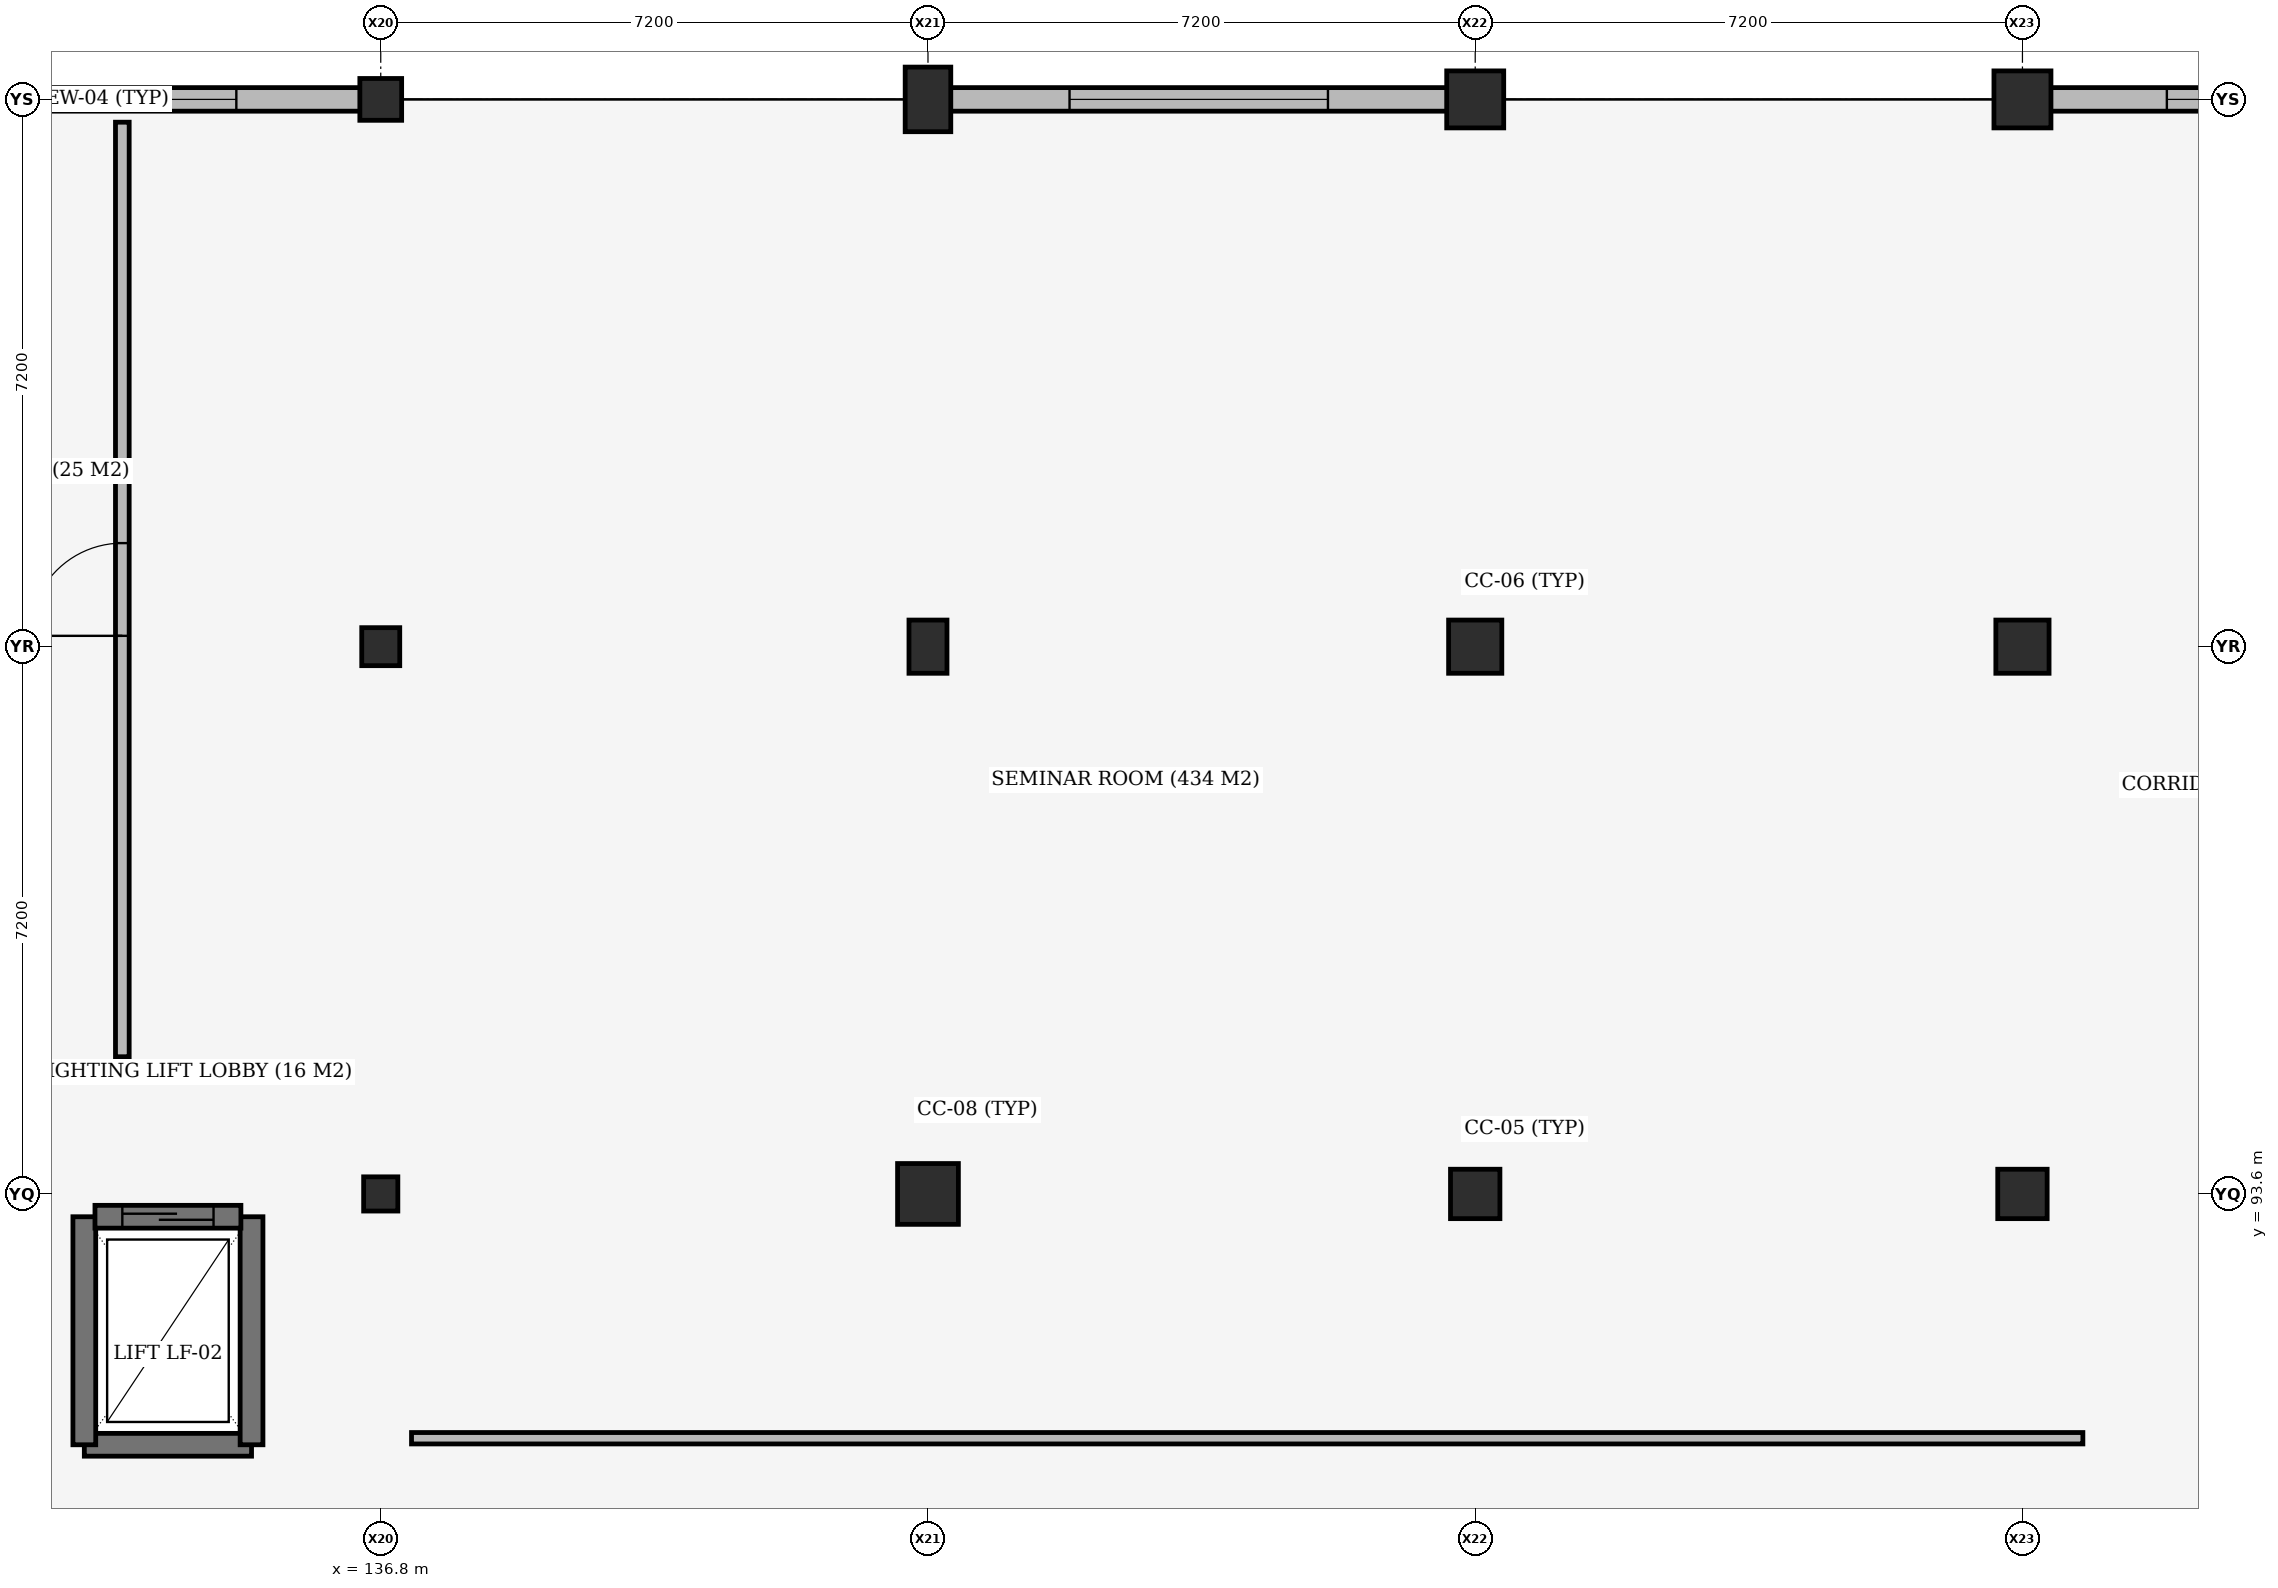
"""IFC4 building model, lengths in metres.
Left out: names, types, materials, properties, quantities, classifications, styles, units other than length and angle.
Written with IfcOpenShell. Run it as: python <this file> out.ifc"""

import sys

from ifc_helpers import new_model, si_unit, direction, frame, frame_2d, origin, origin_2d, place, context, subcontext, project, spatial, rectangle, extrude, element, fill, save


model = new_model("IFC4")
c1 = context("Model", 3, precision=1e-05, world=origin(), true_north=direction((0.0, 1.0)))
c2 = subcontext(c1, "Body", "Model", "MODEL_VIEW")
j1 = project(units=[si_unit("LENGTHUNIT", "METRE"), si_unit("PLANEANGLEUNIT", "RADIAN")], contexts=[c1])
p1 = place(None, origin())
s1 = spatial("IfcSite", under=j1, at=p1, CompositionType="ELEMENT")
p2 = place(p1, origin())
s2 = spatial("IfcBuilding", under=s1, at=p2, CompositionType="ELEMENT")
p3 = place(p2, frame((0.0, 0.0, 5.4)))
s3 = spatial("IfcBuildingStorey", under=s2, at=p3, CompositionType="ELEMENT", Elevation=5.4)
p4 = place(p3, frame((136.8, 93.6, 0.0), z_axis=(0.0, 0.0, 1.0), x_axis=(1.0, 0.0, 0.0)))
e1 = element("IfcColumn", 1, at=p4, inside=s3, PredefinedType="COLUMN", context=c2, shape_type="SweptSolid", body=[
    extrude(rectangle(XDim=0.45, YDim=0.45, at=origin_2d()), origin(), (0.0, 0.0, 1.0), 3.92),
])
p5 = place(p3, frame((136.8, 100.8, 0.0), z_axis=(0.0, 0.0, 1.0), x_axis=(1.0, 0.0, 0.0)))
e2 = element("IfcColumn", 2, at=p5, inside=s3, PredefinedType="COLUMN", context=c2, shape_type="SweptSolid", body=[
    extrude(rectangle(XDim=0.5, YDim=0.5, at=origin_2d()), origin(), (0.0, 0.0, 1.0), 3.92),
])
p6 = place(p3, frame((136.8, 108.0, 0.0), z_axis=(0.0, 0.0, 1.0), x_axis=(1.0, 0.0, 0.0)))
e3 = element("IfcColumn", 3, at=p6, inside=s3, PredefinedType="COLUMN", context=c2, shape_type="SweptSolid", body=[
    extrude(rectangle(XDim=0.55, YDim=0.55, at=origin_2d()), origin(), (0.0, 0.0, 1.0), 3.92),
])
p7 = place(p3, frame((144.0, 93.6, 0.0), z_axis=(0.0, 0.0, 1.0), x_axis=(1.0, 0.0, 0.0)))
e4 = element("IfcColumn", 4, at=p7, inside=s3, PredefinedType="COLUMN", context=c2, shape_type="SweptSolid", body=[
    extrude(rectangle(XDim=0.8, YDim=0.8, at=origin_2d()), origin(), (0.0, 0.0, 1.0), 3.92),
])
p8 = place(p3, frame((144.0, 100.8, 0.0), z_axis=(0.0, 0.0, 1.0), x_axis=(1.0, 0.0, 0.0)))
e5 = element("IfcColumn", 5, at=p8, inside=s3, PredefinedType="COLUMN", context=c2, shape_type="SweptSolid", body=[
    extrude(rectangle(XDim=0.5, YDim=0.7, at=origin_2d()), origin(), (0.0, 0.0, 1.0), 3.92),
])
p9 = place(p3, frame((144.0, 108.0, 0.0), z_axis=(0.0, 0.0, 1.0), x_axis=(1.0, 0.0, 0.0)))
e6 = element("IfcColumn", 6, at=p9, inside=s3, PredefinedType="COLUMN", context=c2, shape_type="SweptSolid", body=[
    extrude(rectangle(XDim=0.6, YDim=0.85, at=origin_2d()), origin(), (0.0, 0.0, 1.0), 3.92),
])
p10 = place(p3, frame((151.2, 93.6, 0.0), z_axis=(0.0, 0.0, 1.0), x_axis=(1.0, 0.0, 0.0)))
e7 = element("IfcColumn", 7, at=p10, inside=s3, PredefinedType="COLUMN", context=c2, shape_type="SweptSolid", body=[
    extrude(rectangle(XDim=0.65, YDim=0.65, at=origin_2d()), origin(), (0.0, 0.0, 1.0), 3.92),
])
p11 = place(p3, frame((151.2, 100.8, 0.0), z_axis=(0.0, 0.0, 1.0), x_axis=(1.0, 0.0, 0.0)))
e8 = element("IfcColumn", 8, at=p11, inside=s3, PredefinedType="COLUMN", context=c2, shape_type="SweptSolid", body=[
    extrude(rectangle(XDim=0.7, YDim=0.7, at=origin_2d()), origin(), (0.0, 0.0, 1.0), 3.92),
])
p12 = place(p3, frame((151.2, 108.0, 0.0), z_axis=(0.0, 0.0, 1.0), x_axis=(1.0, 0.0, 0.0)))
e9 = element("IfcColumn", 9, at=p12, inside=s3, PredefinedType="COLUMN", context=c2, shape_type="SweptSolid", body=[
    extrude(rectangle(XDim=0.75, YDim=0.75, at=origin_2d()), origin(), (0.0, 0.0, 1.0), 3.92),
])
p13 = place(p3, frame((158.4, 93.6, 0.0), z_axis=(0.0, 0.0, 1.0), x_axis=(1.0, 0.0, 0.0)))
e10 = element("IfcColumn", 10, at=p13, inside=s3, PredefinedType="COLUMN", context=c2, shape_type="SweptSolid", body=[
    extrude(rectangle(XDim=0.65, YDim=0.65, at=origin_2d()), origin(), (0.0, 0.0, 1.0), 3.92),
])
p14 = place(p3, frame((158.4, 100.8, 0.0), z_axis=(0.0, 0.0, 1.0), x_axis=(1.0, 0.0, 0.0)))
e11 = element("IfcColumn", 11, at=p14, inside=s3, PredefinedType="COLUMN", context=c2, shape_type="SweptSolid", body=[
    extrude(rectangle(XDim=0.7, YDim=0.7, at=origin_2d()), origin(), (0.0, 0.0, 1.0), 3.92),
])
p15 = place(p3, frame((158.4, 108.0, 0.0), z_axis=(0.0, 0.0, 1.0), x_axis=(1.0, 0.0, 0.0)))
e12 = element("IfcColumn", 12, at=p15, inside=s3, PredefinedType="COLUMN", context=c2, shape_type="SweptSolid", body=[
    extrude(rectangle(XDim=0.75, YDim=0.75, at=origin_2d()), origin(), (0.0, 0.0, 1.0), 3.92),
])
p16 = place(p3, frame((132.9, 90.3, 0.0), z_axis=(0.0, 0.0, 1.0), x_axis=(1.0, 0.0, 0.0)))
e13 = element("IfcWall", 13, at=p16, inside=s3, PredefinedType="SHEAR", context=c2, shape_type="SweptSolid", body=[
    extrude(rectangle(XDim=2.2, YDim=0.3, at=frame_2d((1.1, 0.0))), origin(), (0.0, 0.0, 1.0), 3.92),
])
for number, where, z_axis, x_axis in (
    (14, (132.9, 93.3, 0.0), (0.0, 0.0, 1.0), (0.0, -1.0, 0.0)),
    (15, (135.1, 90.3, 0.0), (0.0, 0.0, 1.0), (0.0, 1.0, 0.0)),
):
    element("IfcWall", number, at=place(p3, frame(where, z_axis=z_axis, x_axis=x_axis)), inside=s3, PredefinedType="SHEAR", context=c2, shape_type="SweptSolid", body=[
        extrude(rectangle(XDim=3.0, YDim=0.3, at=frame_2d((1.5, 0.0))), origin(), (0.0, 0.0, 1.0), 3.92),
    ])
p17 = place(p3, frame((129.867, 108.0, 0.0), z_axis=(0.0, 0.0, 1.0), x_axis=(1.0, 0.0, 0.0)))
e16 = element("IfcWall", 16, at=p17, inside=s3, PredefinedType="STANDARD", context=c2, shape_type="SweptSolid", body=[
    extrude(rectangle(XDim=6.666, YDim=0.31, at=frame_2d((3.333, 0.0))), origin(), (0.0, 0.0, 1.0), 3.34),
])
p18 = place(p17, frame((1.633, 0.0, 0.9)))
e17 = element("IfcOpeningElement", 17, at=p18, cuts=e16, PredefinedType="OPENING", context=c2, shape_type="SweptSolid", body=[
    extrude(rectangle(XDim=3.4, YDim=1.5, at=frame_2d((1.7, 0.75))), frame((0.0, 0.165, 0.0), z_axis=(0.0, -1.0, 0.0), x_axis=(1.0, 0.0, 0.0)), (0.0, 0.0, 1.0), 0.33),
])
p19 = place(p3, frame((144.292, 108.0, 0.0), z_axis=(0.0, 0.0, 1.0), x_axis=(1.0, 0.0, 0.0)))
e18 = element("IfcWall", 18, at=p19, inside=s3, PredefinedType="STANDARD", context=c2, shape_type="SweptSolid", body=[
    extrude(rectangle(XDim=6.541, YDim=0.31, at=frame_2d((3.271, 0.0))), origin(), (0.0, 0.0, 1.0), 3.24),
])
p20 = place(p19, frame((1.571, 0.0, 0.9)))
e19 = element("IfcOpeningElement", 19, at=p20, cuts=e18, PredefinedType="OPENING", context=c2, shape_type="SweptSolid", body=[
    extrude(rectangle(XDim=3.4, YDim=1.5, at=frame_2d((1.7, 0.75))), frame((0.0, 0.165, 0.0), z_axis=(0.0, -1.0, 0.0), x_axis=(1.0, 0.0, 0.0)), (0.0, 0.0, 1.0), 0.33),
])
p21 = place(p3, frame((158.767, 108.0, 0.0), z_axis=(0.0, 0.0, 1.0), x_axis=(1.0, 0.0, 0.0)))
e20 = element("IfcWall", 20, at=p21, inside=s3, PredefinedType="STANDARD", context=c2, shape_type="SweptSolid", body=[
    extrude(rectangle(XDim=6.466, YDim=0.31, at=frame_2d((3.233, 0.0))), origin(), (0.0, 0.0, 1.0), 3.4),
])
p22 = place(p21, frame((1.533, 0.0, 0.9)))
e21 = element("IfcOpeningElement", 21, at=p22, cuts=e20, PredefinedType="OPENING", context=c2, shape_type="SweptSolid", body=[
    extrude(rectangle(XDim=3.4, YDim=1.5, at=frame_2d((1.7, 0.75))), frame((0.0, 0.165, 0.0), z_axis=(0.0, -1.0, 0.0), x_axis=(1.0, 0.0, 0.0)), (0.0, 0.0, 1.0), 0.33),
])
p23 = place(p3, frame((133.04, 93.3, 0.0), z_axis=(0.0, 0.0, 1.0), x_axis=(1.0, 0.0, 0.0)))
e22 = element("IfcWall", 22, at=p23, inside=s3, PredefinedType="SHEAR", context=c2, shape_type="SweptSolid", body=[
    extrude(rectangle(XDim=1.92, YDim=0.3, at=frame_2d((0.96, 0.0))), origin(), (0.0, 0.0, 1.0), 3.92),
])
p24 = place(p23, frame((0.36, 0.0, 0.0)))
e23 = element("IfcOpeningElement", 23, at=p24, cuts=e22, PredefinedType="OPENING", context=c2, shape_type="SweptSolid", body=[
    extrude(rectangle(XDim=1.2, YDim=2.1, at=frame_2d((0.6, 1.05))), frame((0.0, 0.16, 0.0), z_axis=(0.0, -1.0, 0.0), x_axis=(1.0, 0.0, 0.0)), (0.0, 0.0, 1.0), 0.32),
])
p25 = place(p3, frame((137.205, 90.386, 0.0), z_axis=(0.0, 0.0, 1.0), x_axis=(1.0, 0.0, 0.0)))
e24 = element("IfcWall", 24, at=p25, inside=s3, PredefinedType="PARTITIONING", context=c2, shape_type="SweptSolid", body=[
    extrude(rectangle(XDim=21.99, YDim=0.15, at=frame_2d((10.995, 0.0))), origin(), (0.0, 0.0, 1.0), 3.18),
])
p26 = place(p3, frame((133.4, 95.405, 0.0), z_axis=(0.0, 0.0, 1.0), x_axis=(0.0, 1.0, 0.0)))
e25 = element("IfcWall", 25, at=p26, inside=s3, PredefinedType="PARTITIONING", context=c2, shape_type="SweptSolid", body=[
    extrude(rectangle(XDim=12.295, YDim=0.18, at=frame_2d((6.147, 0.0))), origin(), (0.0, 0.0, 1.0), 3.18),
])
p27 = place(p26, frame((5.538, 0.0, 0.0)))
e26 = element("IfcOpeningElement", 26, at=p27, cuts=e25, PredefinedType="OPENING", context=c2, shape_type="SweptSolid", body=[
    extrude(rectangle(XDim=1.22, YDim=2.25, at=frame_2d((0.61, 1.125))), frame((0.0, 0.1, 0.0), z_axis=(0.0, -1.0, 0.0), x_axis=(1.0, 0.0, 0.0)), (0.0, 0.0, 1.0), 0.2),
])
p28 = place(p18, origin())
e27 = element("IfcWindow", 27, at=p28, inside=s3, PartitioningType="DOUBLE_PANEL_VERTICAL", PredefinedType="WINDOW", context=c2, shape_type="SweptSolid", body=[
    extrude(rectangle(XDim=3.4, YDim=1.5, at=frame_2d((1.7, 0.75))), frame((0.0, 0.03, 0.0), z_axis=(0.0, -1.0, 0.0), x_axis=(1.0, 0.0, 0.0)), (0.0, 0.0, 1.0), 0.06),
])
fill(e17, e27)
p29 = place(p20, origin())
e28 = element("IfcWindow", 28, at=p29, inside=s3, PartitioningType="DOUBLE_PANEL_VERTICAL", PredefinedType="WINDOW", context=c2, shape_type="SweptSolid", body=[
    extrude(rectangle(XDim=3.4, YDim=1.5, at=frame_2d((1.7, 0.75))), frame((0.0, 0.03, 0.0), z_axis=(0.0, -1.0, 0.0), x_axis=(1.0, 0.0, 0.0)), (0.0, 0.0, 1.0), 0.06),
])
fill(e19, e28)
p30 = place(p22, origin())
e29 = element("IfcWindow", 29, at=p30, inside=s3, PartitioningType="DOUBLE_PANEL_VERTICAL", PredefinedType="WINDOW", context=c2, shape_type="SweptSolid", body=[
    extrude(rectangle(XDim=3.4, YDim=1.5, at=frame_2d((1.7, 0.75))), frame((0.0, 0.03, 0.0), z_axis=(0.0, -1.0, 0.0), x_axis=(1.0, 0.0, 0.0)), (0.0, 0.0, 1.0), 0.06),
])
fill(e21, e29)
p31 = place(p24, origin())
e30 = element("IfcDoor", 30, at=p31, inside=s3, OperationType="SLIDING_TO_LEFT", PredefinedType="DOOR", context=c2, shape_type="SweptSolid", body=[
    extrude(rectangle(XDim=1.2, YDim=2.1, at=frame_2d((0.6, 1.05))), frame((0.0, 0.025, 0.0), z_axis=(0.0, -1.0, 0.0), x_axis=(1.0, 0.0, 0.0)), (0.0, 0.0, 1.0), 0.05),
])
fill(e23, e30)
p32 = place(p27, origin())
e31 = element("IfcDoor", 31, at=p32, inside=s3, OperationType="SINGLE_SWING_LEFT", PredefinedType="DOOR", context=c2, shape_type="SweptSolid", body=[
    extrude(rectangle(XDim=1.22, YDim=2.25, at=frame_2d((0.61, 1.125))), frame((0.0, 0.025, 0.0), z_axis=(0.0, -1.0, 0.0), x_axis=(1.0, 0.0, 0.0)), (0.0, 0.0, 1.0), 0.05),
])
fill(e26, e31)
save(model, sys.argv[1])
